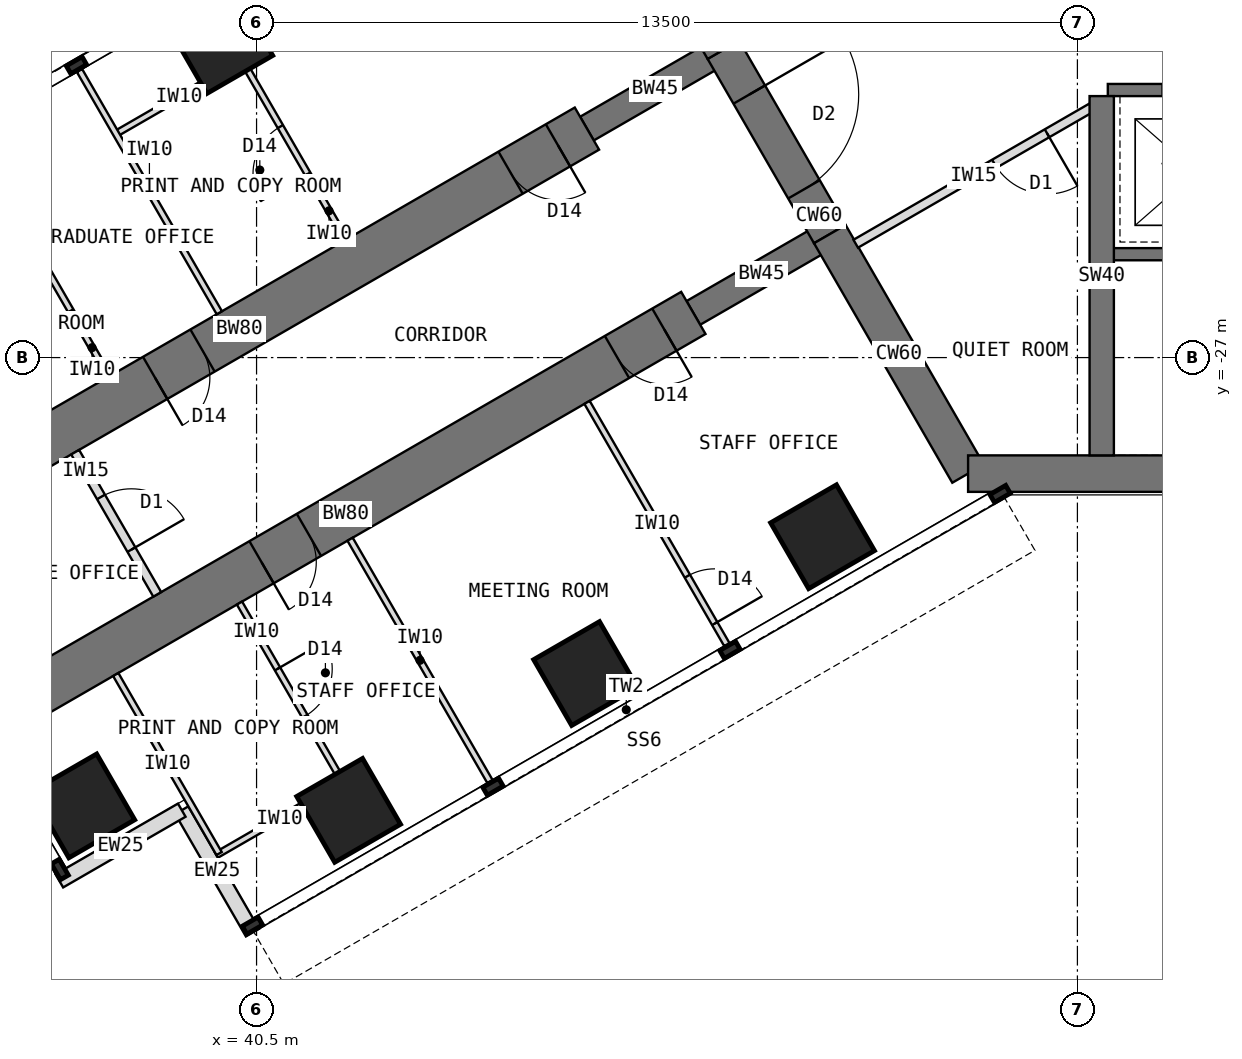
"""IFC4 building model, lengths in metres.
Left out: names, types, materials, properties, quantities, classifications, styles, units other than length and angle.
Written with IfcOpenShell. Run it as: python <this file> out.ifc"""

import sys

from ifc_helpers import new_model, si_unit, direction, frame, frame_2d, origin, origin_2d, place, context, subcontext, project, spatial, rectangle, extrude, element, fill, save


model = new_model("IFC4")
c1 = context("Model", 3, precision=1e-05, world=origin(), true_north=direction((0.0, 1.0)))
c2 = subcontext(c1, "Body", "Model", "MODEL_VIEW")
j1 = project(units=[si_unit("LENGTHUNIT", "METRE"), si_unit("PLANEANGLEUNIT", "RADIAN")], contexts=[c1])
p1 = place(None, origin())
s1 = spatial("IfcSite", under=j1, at=p1, CompositionType="ELEMENT")
p2 = place(p1, origin())
s2 = spatial("IfcBuilding", under=s1, at=p2, CompositionType="ELEMENT")
p3 = place(p2, frame((0.0, 0.0, 157.5)))
s3 = spatial("IfcBuildingStorey", under=s2, at=p3, CompositionType="ELEMENT", Elevation=157.5)
p4 = place(p3, frame((45.904, -18.0, 0.0), z_axis=(0.0, 0.0, 1.0), x_axis=(0.500024481964, -0.866011268655, 0.0)))
e1 = element("IfcWall", 1, at=p4, inside=s3, PredefinedType="SHEAR", context=c2, shape_type="SweptSolid", body=[
    extrude(rectangle(XDim=4.548, YDim=0.6, at=frame_2d((2.274, 0.0))), origin(), (0.0, 0.0, 1.0), 4.0),
])
p5 = place(p3, frame((48.178, -21.939, 0.0), z_axis=(0.0, 0.0, 1.0), x_axis=(0.500010275428, -0.866019471182, 0.0)))
e2 = element("IfcWall", 2, at=p5, inside=s3, PredefinedType="SHEAR", context=c2, shape_type="SweptSolid", body=[
    extrude(rectangle(XDim=3.5, YDim=0.6, at=frame_2d((1.75, 0.0))), origin(), (0.0, 0.0, 1.0), 4.0),
])
p6 = place(p5, frame((0.85, 0.0, 0.0)))
e3 = element("IfcOpeningElement", 3, at=p6, cuts=e2, PredefinedType="OPENING", context=c2, shape_type="SweptSolid", body=[
    extrude(rectangle(XDim=1.8, YDim=2.1, at=frame_2d((0.9, 1.05))), frame((0.0, 0.31, 0.0), z_axis=(0.0, -1.0, 0.0), x_axis=(1.0, 0.0, 0.0)), (0.0, 0.0, 1.0), 0.62),
])
p7 = place(p3, frame((49.928, -24.97, 0.0), z_axis=(0.0, 0.0, 1.0), x_axis=(0.499984222037, -0.866034513004, 0.0)))
e4 = element("IfcWall", 4, at=p7, inside=s3, PredefinedType="SHEAR", context=c2, shape_type="SweptSolid", body=[
    extrude(rectangle(XDim=4.548, YDim=0.6, at=frame_2d((2.274, 0.0))), origin(), (0.0, 0.0, 1.0), 4.0),
])
p8 = place(p3, frame((52.202, -28.908, 0.0), z_axis=(0.0, 0.0, 1.0), x_axis=(1.0, 0.0, 0.0)))
e5 = element("IfcWall", 5, at=p8, inside=s3, PredefinedType="SHEAR", context=c2, shape_type="SweptSolid", body=[
    extrude(rectangle(XDim=12.596, YDim=0.6, at=frame_2d((6.298, 0.0))), origin(), (0.0, 0.0, 1.0), 4.0),
])
p9 = place(p3, frame((49.928, -24.97, 0.0), z_axis=(0.0, 0.0, 1.0), x_axis=(-0.866031863473, -0.499988811324, 0.0)))
e6 = element("IfcWall", 6, at=p9, inside=s3, PredefinedType="SHEAR", context=c2, shape_type="SweptSolid", body=[
    extrude(rectangle(XDim=2.592, YDim=0.45, at=frame_2d((1.296, 0.0))), origin(), (0.0, 0.0, 1.0), 4.0),
])
p10 = place(p3, frame((47.684, -26.266, 0.0), z_axis=(0.0, 0.0, 1.0), x_axis=(-0.866027579429, -0.499996231654, 0.0)))
e7 = element("IfcWall", 7, at=p10, inside=s3, PredefinedType="SHEAR", context=c2, shape_type="SweptSolid", body=[
    extrude(rectangle(XDim=13.2, YDim=0.8, at=frame_2d((6.6, 0.0))), origin(), (0.0, 0.0, 1.0), 4.0),
])
p11 = place(p10, frame((0.55, 0.0, 0.0)))
e8 = element("IfcOpeningElement", 8, at=p11, cuts=e7, PredefinedType="OPENING", context=c2, shape_type="SweptSolid", body=[
    extrude(rectangle(XDim=0.9, YDim=2.1, at=frame_2d((0.45, 1.05))), frame((0.0, 0.41, 0.0), z_axis=(0.0, -1.0, 0.0), x_axis=(1.0, 0.0, 0.0)), (0.0, 0.0, 1.0), 0.82),
])
p12 = place(p10, frame((7.3, 0.0, 0.0)))
e9 = element("IfcOpeningElement", 9, at=p12, cuts=e7, PredefinedType="OPENING", context=c2, shape_type="SweptSolid", body=[
    extrude(rectangle(XDim=0.9, YDim=2.1, at=frame_2d((0.45, 1.05))), frame((0.0, 0.41, 0.0), z_axis=(0.0, -1.0, 0.0), x_axis=(1.0, 0.0, 0.0)), (0.0, 0.0, 1.0), 0.82),
])
p13 = place(p3, frame((48.178, -21.939, 0.0), z_axis=(0.0, 0.0, 1.0), x_axis=(-0.866072649678, -0.499918158782, 0.0)))
e10 = element("IfcWall", 10, at=p13, inside=s3, PredefinedType="SHEAR", context=c2, shape_type="SweptSolid", body=[
    extrude(rectangle(XDim=2.592, YDim=0.45, at=frame_2d((1.296, 0.0))), origin(), (0.0, 0.0, 1.0), 4.0),
])
p14 = place(p3, frame((45.934, -23.234, 0.0), z_axis=(0.0, 0.0, 1.0), x_axis=(-0.866019570528, -0.500010103361, 0.0)))
e11 = element("IfcWall", 11, at=p14, inside=s3, PredefinedType="SHEAR", context=c2, shape_type="SweptSolid", body=[
    extrude(rectangle(XDim=13.2, YDim=0.8, at=frame_2d((6.6, 0.0))), origin(), (0.0, 0.0, 1.0), 4.0),
])
p15 = place(p14, frame((0.55, 0.0, 0.0)))
e12 = element("IfcOpeningElement", 12, at=p15, cuts=e11, PredefinedType="OPENING", context=c2, shape_type="SweptSolid", body=[
    extrude(rectangle(XDim=0.9, YDim=2.1, at=frame_2d((0.45, 1.05))), frame((0.0, 0.41, 0.0), z_axis=(0.0, -1.0, 0.0), x_axis=(1.0, 0.0, 0.0)), (0.0, 0.0, 1.0), 0.82),
])
p16 = place(p14, frame((7.3, 0.0, 0.0)))
e13 = element("IfcOpeningElement", 13, at=p16, cuts=e11, PredefinedType="OPENING", context=c2, shape_type="SweptSolid", body=[
    extrude(rectangle(XDim=0.9, YDim=2.1, at=frame_2d((0.45, 1.05))), frame((0.0, 0.41, 0.0), z_axis=(0.0, -1.0, 0.0), x_axis=(1.0, 0.0, 0.0)), (0.0, 0.0, 1.0), 0.82),
])
for number, where, z_axis, x_axis in (
    (14, (49.809, -29.946, 0.0), (0.0, 0.0, 1.0), (0.866, 0.5, 0.0)),
    (15, (45.912, -32.196, 0.0), (0.0, 0.0, 1.0), (0.866, 0.5, 0.0)),
    (16, (39.912, -21.804, 0.0), (0.0, 0.0, 1.0), (0.866, 0.5, 0.0)),
    (17, (42.014, -34.446, 0.0), (0.0, 0.0, 1.0), (0.866, 0.5, 0.0)),
    (18, (37.642, -34.373, 0.0), (0.0, 0.0, 1.0), (0.866, 0.5, 0.0)),
):
    element("IfcColumn", number, at=place(p3, frame(where, z_axis=z_axis, x_axis=x_axis)), inside=s3, PredefinedType="COLUMN", context=c2, shape_type="SweptSolid", body=[
        extrude(rectangle(XDim=1.25, YDim=1.25, at=origin_2d()), origin(), (0.0, 0.0, 1.0), 4.0),
    ])
for number, where, z_axis, x_axis in (
    (19, (40.433, -36.456, 0.0), (0.0, 0.0, 1.0), (-0.5, 0.866, 0.0)),
    (20, (39.27, -34.443, 0.0), (0.0, 0.0, 1.0), (-0.866, -0.5, 0.0)),
):
    element("IfcWall", number, at=place(p3, frame(where, z_axis=z_axis, x_axis=x_axis)), inside=s3, PredefinedType="STANDARD", context=c2, shape_type="SweptSolid", body=[
        extrude(rectangle(XDim=2.325, YDim=0.25, at=frame_2d((1.163, 0.0))), origin(), (0.0, 0.0, 1.0), 3.8),
    ])
p17 = place(p3, frame((54.5, -22.6, 0.0), z_axis=(0.0, 0.0, 1.0), x_axis=(1.0, 0.0, 0.0)))
e21 = element("IfcWall", 21, at=p17, inside=s3, PredefinedType="SHEAR", context=c2, shape_type="SweptSolid", body=[
    extrude(rectangle(XDim=8.0, YDim=0.2, at=frame_2d((4.0, 0.0))), origin(), (0.0, 0.0, 1.0), 4.0),
])
p18 = place(p17, frame((6.3, 0.0, 0.0)))
e22 = element("IfcOpeningElement", 22, at=p18, cuts=e21, PredefinedType="OPENING", context=c2, shape_type="SweptSolid", body=[
    extrude(rectangle(XDim=1.2, YDim=2.1, at=frame_2d((0.6, 1.05))), frame((0.0, 0.11, 0.0), z_axis=(0.0, -1.0, 0.0), x_axis=(1.0, 0.0, 0.0)), (0.0, 0.0, 1.0), 0.22),
])
p19 = place(p17, frame((0.9, 0.0, 0.0)))
e23 = element("IfcOpeningElement", 23, at=p19, cuts=e21, PredefinedType="OPENING", context=c2, shape_type="SweptSolid", body=[
    extrude(rectangle(XDim=1.1, YDim=2.2, at=frame_2d((0.55, 1.1))), frame((0.0, 0.11, 0.0), z_axis=(0.0, -1.0, 0.0), x_axis=(1.0, 0.0, 0.0)), (0.0, 0.0, 1.0), 0.22),
])
p20 = place(p3, frame((54.5, -25.3, 0.0), z_axis=(0.0, 0.0, 1.0), x_axis=(1.0, 0.0, 0.0)))
e24 = element("IfcWall", 24, at=p20, inside=s3, PredefinedType="SHEAR", context=c2, shape_type="SweptSolid", body=[
    extrude(rectangle(XDim=8.0, YDim=0.2, at=frame_2d((4.0, 0.0))), origin(), (0.0, 0.0, 1.0), 4.0),
])
p21 = place(p20, frame((6.7, 0.0, 0.0)))
e25 = element("IfcOpeningElement", 25, at=p21, cuts=e24, PredefinedType="OPENING", context=c2, shape_type="SweptSolid", body=[
    extrude(rectangle(XDim=1.1, YDim=2.1, at=frame_2d((0.55, 1.05))), frame((0.0, 0.11, 0.0), z_axis=(0.0, -1.0, 0.0), x_axis=(1.0, 0.0, 0.0)), (0.0, 0.0, 1.0), 0.22),
])
p22 = place(p3, frame((54.4, -22.7, 0.0), z_axis=(0.0, 0.0, 1.0), x_axis=(0.0, -1.0, 0.0)))
e26 = element("IfcWall", 26, at=p22, inside=s3, PredefinedType="SHEAR", context=c2, shape_type="SweptSolid", body=[
    extrude(rectangle(XDim=5.908, YDim=0.4, at=frame_2d((2.954, 0.0))), origin(), (0.0, 0.0, 1.0), 4.0),
])
p23 = place(p3, frame((45.935, -27.737, 0.0), z_axis=(0.0, 0.0, 1.0), x_axis=(0.500014953309, -0.866016770315, 0.0)))
e27 = element("IfcWall", 27, at=p23, inside=s3, PredefinedType="PARTITIONING", context=c2, shape_type="SweptSolid", body=[
    extrude(rectangle(XDim=4.6, YDim=0.1, at=frame_2d((2.3, 0.0))), origin(), (0.0, 0.0, 1.0), 3.8),
])
p24 = place(p23, frame((3.3, 0.0, 0.0)))
e28 = element("IfcOpeningElement", 28, at=p24, cuts=e27, PredefinedType="OPENING", context=c2, shape_type="SweptSolid", body=[
    extrude(rectangle(XDim=0.9, YDim=2.1, at=frame_2d((0.45, 1.05))), frame((0.0, 0.06, 0.0), z_axis=(0.0, -1.0, 0.0), x_axis=(1.0, 0.0, 0.0)), (0.0, 0.0, 1.0), 0.12),
])
p25 = place(p3, frame((42.038, -29.987, 0.0), z_axis=(0.0, 0.0, 1.0), x_axis=(0.499975146636, -0.866039752405, 0.0)))
e29 = element("IfcWall", 29, at=p25, inside=s3, PredefinedType="PARTITIONING", context=c2, shape_type="SweptSolid", body=[
    extrude(rectangle(XDim=4.6, YDim=0.1, at=frame_2d((2.3, 0.0))), origin(), (0.0, 0.0, 1.0), 3.8),
])
p26 = place(p3, frame((41.919, -33.981, 0.0), z_axis=(0.0, 0.0, 1.0), x_axis=(-0.866050077142, -0.499957262057, 0.0)))
e30 = element("IfcWall", 30, at=p26, inside=s3, PredefinedType="PARTITIONING", context=c2, shape_type="SweptSolid", body=[
    extrude(rectangle(XDim=2.4, YDim=0.1, at=frame_2d((1.2, 0.0))), origin(), (0.0, 0.0, 1.0), 3.8),
])
p27 = place(p3, frame((40.219, -31.037, 0.0), z_axis=(0.0, 0.0, 1.0), x_axis=(0.500031147688, -0.866007419912, 0.0)))
e31 = element("IfcWall", 31, at=p27, inside=s3, PredefinedType="PARTITIONING", context=c2, shape_type="SweptSolid", body=[
    extrude(rectangle(XDim=3.4, YDim=0.1, at=frame_2d((1.7, 0.0))), origin(), (0.0, 0.0, 1.0), 3.8),
])
p28 = place(p27, frame((1.25, 0.0, 0.0)))
e32 = element("IfcOpeningElement", 32, at=p28, cuts=e31, PredefinedType="OPENING", context=c2, shape_type="SweptSolid", body=[
    extrude(rectangle(XDim=0.9, YDim=2.1, at=frame_2d((0.45, 1.05))), frame((0.0, 0.06, 0.0), z_axis=(0.0, -1.0, 0.0), x_axis=(1.0, 0.0, 0.0)), (0.0, 0.0, 1.0), 0.12),
])
p29 = place(p3, frame((38.184, -32.212, 0.0), z_axis=(0.0, 0.0, 1.0), x_axis=(0.500031147688, -0.866007419912, 0.0)))
e33 = element("IfcWall", 33, at=p29, inside=s3, PredefinedType="PARTITIONING", context=c2, shape_type="SweptSolid", body=[
    extrude(rectangle(XDim=3.4, YDim=0.1, at=frame_2d((1.7, 0.0))), origin(), (0.0, 0.0, 1.0), 3.8),
])
p30 = place(p3, frame((39.888, -26.263, 0.0), z_axis=(0.0, 0.0, 1.0), x_axis=(-0.500014953309, 0.866016770315, 0.0)))
e34 = element("IfcWall", 34, at=p30, inside=s3, PredefinedType="PARTITIONING", context=c2, shape_type="SweptSolid", body=[
    extrude(rectangle(XDim=4.6, YDim=0.1, at=frame_2d((2.3, 0.0))), origin(), (0.0, 0.0, 1.0), 3.8),
])
p31 = place(p3, frame((40.266, -22.119, 0.0), z_axis=(0.0, 0.0, 1.0), x_axis=(-0.866024647952, -0.500001309137, 0.0)))
e35 = element("IfcWall", 35, at=p31, inside=s3, PredefinedType="PARTITIONING", context=c2, shape_type="SweptSolid", body=[
    extrude(rectangle(XDim=2.4, YDim=0.1, at=frame_2d((1.2, 0.0))), origin(), (0.0, 0.0, 1.0), 3.8),
])
p32 = place(p3, frame((41.967, -25.063, 0.0), z_axis=(0.0, 0.0, 1.0), x_axis=(-0.500062241894, 0.865989465428, 0.0)))
e36 = element("IfcWall", 36, at=p32, inside=s3, PredefinedType="PARTITIONING", context=c2, shape_type="SweptSolid", body=[
    extrude(rectangle(XDim=3.4, YDim=0.1, at=frame_2d((1.7, 0.0))), origin(), (0.0, 0.0, 1.0), 3.8),
])
p33 = place(p32, frame((1.25, 0.0, 0.0)))
e37 = element("IfcOpeningElement", 37, at=p33, cuts=e36, PredefinedType="OPENING", context=c2, shape_type="SweptSolid", body=[
    extrude(rectangle(XDim=0.9, YDim=2.1, at=frame_2d((0.45, 1.05))), frame((0.0, 0.06, 0.0), z_axis=(0.0, -1.0, 0.0), x_axis=(1.0, 0.0, 0.0)), (0.0, 0.0, 1.0), 0.12),
])
p34 = place(p3, frame((38.069, -27.313, 0.0), z_axis=(0.0, 0.0, 1.0), x_axis=(-0.500008388397, 0.866020560687, 0.0)))
e38 = element("IfcWall", 38, at=p34, inside=s3, PredefinedType="PARTITIONING", context=c2, shape_type="SweptSolid", body=[
    extrude(rectangle(XDim=3.4, YDim=0.1, at=frame_2d((1.7, 0.0))), origin(), (0.0, 0.0, 1.0), 3.8),
])
p35 = place(p34, frame((1.25, 0.0, 0.0)))
e39 = element("IfcOpeningElement", 39, at=p35, cuts=e38, PredefinedType="OPENING", context=c2, shape_type="SweptSolid", body=[
    extrude(rectangle(XDim=0.9, YDim=2.1, at=frame_2d((0.45, 1.05))), frame((0.0, 0.06, 0.0), z_axis=(0.0, -1.0, 0.0), x_axis=(1.0, 0.0, 0.0)), (0.0, 0.0, 1.0), 0.12),
])
p36 = place(p3, frame((54.23, -22.89, 0.0), z_axis=(0.0, 0.0, 1.0), x_axis=(-0.866025707867, -0.499999473313, 0.0)))
e40 = element("IfcWall", 40, at=p36, inside=s3, PredefinedType="PARTITIONING", context=c2, shape_type="SweptSolid", body=[
    extrude(rectangle(XDim=4.476, YDim=0.15, at=frame_2d((2.238, 0.0))), origin(), (0.0, 0.0, 1.0), 3.8),
])
p37 = place(p36, frame((0.843, 0.0, 0.0)))
e41 = element("IfcOpeningElement", 41, at=p37, cuts=e40, PredefinedType="OPENING", context=c2, shape_type="SweptSolid", body=[
    extrude(rectangle(XDim=1.0, YDim=2.1, at=frame_2d((0.5, 1.05))), frame((0.0, 0.085, 0.0), z_axis=(0.0, -1.0, 0.0), x_axis=(1.0, 0.0, 0.0)), (0.0, 0.0, 1.0), 0.17),
])
p38 = place(p3, frame((37.517, -28.556, 0.0), z_axis=(0.0, 0.0, 1.0), x_axis=(0.500048589285, -0.86599734893, 0.0)))
e42 = element("IfcWall", 42, at=p38, inside=s3, PredefinedType="PARTITIONING", context=c2, shape_type="SweptSolid", body=[
    extrude(rectangle(XDim=2.7, YDim=0.15, at=frame_2d((1.35, 0.0))), origin(), (0.0, 0.0, 1.0), 3.8),
])
p39 = place(p38, frame((0.85, 0.0, 0.0)))
e43 = element("IfcOpeningElement", 43, at=p39, cuts=e42, PredefinedType="OPENING", context=c2, shape_type="SweptSolid", body=[
    extrude(rectangle(XDim=1.0, YDim=2.1, at=frame_2d((0.5, 1.05))), frame((0.0, 0.085, 0.0), z_axis=(0.0, -1.0, 0.0), x_axis=(1.0, 0.0, 0.0)), (0.0, 0.0, 1.0), 0.17),
])
p40 = place(p6, origin())
e44 = element("IfcDoor", 44, at=p40, inside=s3, OperationType="DOUBLE_DOOR_DOUBLE_SWING", PredefinedType="DOOR", context=c2, shape_type="SweptSolid", body=[
    extrude(rectangle(XDim=1.72, YDim=2.06, at=frame_2d((0.9, 1.03))), frame((0.0, 0.025, 0.0), z_axis=(0.0, -1.0, 0.0), x_axis=(1.0, 0.0, 0.0)), (0.0, 0.0, 1.0), 0.05),
    extrude(rectangle(XDim=0.04, YDim=2.1, at=frame_2d((0.02, 1.05))), frame((0.0, 0.3, 0.0), z_axis=(0.0, -1.0, 0.0), x_axis=(1.0, 0.0, 0.0)), (0.0, 0.0, 1.0), 0.6),
    extrude(rectangle(XDim=0.04, YDim=2.1, at=frame_2d((1.78, 1.05))), frame((0.0, 0.3, 0.0), z_axis=(0.0, -1.0, 0.0), x_axis=(1.0, 0.0, 0.0)), (0.0, 0.0, 1.0), 0.6),
    extrude(rectangle(XDim=1.72, YDim=0.04, at=frame_2d((0.9, 2.08))), frame((0.0, 0.3, 0.0), z_axis=(0.0, -1.0, 0.0), x_axis=(1.0, 0.0, 0.0)), (0.0, 0.0, 1.0), 0.6),
])
fill(e3, e44)
p41 = place(p24, origin())
e45 = element("IfcDoor", 45, at=p41, inside=s3, OperationType="SINGLE_SWING_RIGHT", PredefinedType="DOOR", context=c2, shape_type="SweptSolid", body=[
    extrude(rectangle(XDim=0.9, YDim=2.1, at=frame_2d((0.45, 1.05))), frame((0.0, 0.025, 0.0), z_axis=(0.0, -1.0, 0.0), x_axis=(1.0, 0.0, 0.0)), (0.0, 0.0, 1.0), 0.05),
])
fill(e28, e45)
p42 = place(p28, origin())
e46 = element("IfcDoor", 46, at=p42, inside=s3, OperationType="SINGLE_SWING_LEFT", PredefinedType="DOOR", context=c2, shape_type="SweptSolid", body=[
    extrude(rectangle(XDim=0.9, YDim=2.1, at=frame_2d((0.45, 1.05))), frame((0.0, 0.025, 0.0), z_axis=(0.0, -1.0, 0.0), x_axis=(1.0, 0.0, 0.0)), (0.0, 0.0, 1.0), 0.05),
])
fill(e32, e46)
p43 = place(p33, origin())
e47 = element("IfcDoor", 47, at=p43, inside=s3, OperationType="SINGLE_SWING_LEFT", PredefinedType="DOOR", context=c2, shape_type="SweptSolid", body=[
    extrude(rectangle(XDim=0.9, YDim=2.1, at=frame_2d((0.45, 1.05))), frame((0.0, 0.025, 0.0), z_axis=(0.0, -1.0, 0.0), x_axis=(1.0, 0.0, 0.0)), (0.0, 0.0, 1.0), 0.05),
])
fill(e37, e47)
p44 = place(p35, origin())
e48 = element("IfcDoor", 48, at=p44, inside=s3, OperationType="SINGLE_SWING_LEFT", PredefinedType="DOOR", context=c2, shape_type="SweptSolid", body=[
    extrude(rectangle(XDim=0.9, YDim=2.1, at=frame_2d((0.45, 1.05))), frame((0.0, 0.025, 0.0), z_axis=(0.0, -1.0, 0.0), x_axis=(1.0, 0.0, 0.0)), (0.0, 0.0, 1.0), 0.05),
])
fill(e39, e48)
p45 = place(p37, origin())
e49 = element("IfcDoor", 49, at=p45, inside=s3, OperationType="SINGLE_SWING_LEFT", PredefinedType="DOOR", context=c2, shape_type="SweptSolid", body=[
    extrude(rectangle(XDim=1.0, YDim=2.1, at=frame_2d((0.5, 1.05))), frame((0.0, 0.025, 0.0), z_axis=(0.0, -1.0, 0.0), x_axis=(1.0, 0.0, 0.0)), (0.0, 0.0, 1.0), 0.05),
])
fill(e41, e49)
p46 = place(p39, origin())
e50 = element("IfcDoor", 50, at=p46, inside=s3, OperationType="SINGLE_SWING_RIGHT", PredefinedType="DOOR", context=c2, shape_type="SweptSolid", body=[
    extrude(rectangle(XDim=1.0, YDim=2.1, at=frame_2d((0.5, 1.05))), frame((0.0, 0.025, 0.0), z_axis=(0.0, -1.0, 0.0), x_axis=(1.0, 0.0, 0.0)), (0.0, 0.0, 1.0), 0.05),
])
fill(e43, e50)
p47 = place(p11, origin())
e51 = element("IfcDoor", 51, at=p47, inside=s3, OperationType="SINGLE_SWING_LEFT", PredefinedType="DOOR", context=c2, shape_type="SweptSolid", body=[
    extrude(rectangle(XDim=0.82, YDim=2.06, at=frame_2d((0.45, 1.03))), frame((0.0, 0.025, 0.0), z_axis=(0.0, -1.0, 0.0), x_axis=(1.0, 0.0, 0.0)), (0.0, 0.0, 1.0), 0.05),
    extrude(rectangle(XDim=0.04, YDim=2.1, at=frame_2d((0.02, 1.05))), frame((0.0, 0.4, 0.0), z_axis=(0.0, -1.0, 0.0), x_axis=(1.0, 0.0, 0.0)), (0.0, 0.0, 1.0), 0.8),
    extrude(rectangle(XDim=0.04, YDim=2.1, at=frame_2d((0.88, 1.05))), frame((0.0, 0.4, 0.0), z_axis=(0.0, -1.0, 0.0), x_axis=(1.0, 0.0, 0.0)), (0.0, 0.0, 1.0), 0.8),
    extrude(rectangle(XDim=0.82, YDim=0.04, at=frame_2d((0.45, 2.08))), frame((0.0, 0.4, 0.0), z_axis=(0.0, -1.0, 0.0), x_axis=(1.0, 0.0, 0.0)), (0.0, 0.0, 1.0), 0.8),
])
fill(e8, e51)
p48 = place(p12, origin())
e52 = element("IfcDoor", 52, at=p48, inside=s3, OperationType="SINGLE_SWING_RIGHT", PredefinedType="DOOR", context=c2, shape_type="SweptSolid", body=[
    extrude(rectangle(XDim=0.82, YDim=2.06, at=frame_2d((0.45, 1.03))), frame((0.0, 0.025, 0.0), z_axis=(0.0, -1.0, 0.0), x_axis=(1.0, 0.0, 0.0)), (0.0, 0.0, 1.0), 0.05),
    extrude(rectangle(XDim=0.04, YDim=2.1, at=frame_2d((0.02, 1.05))), frame((0.0, 0.4, 0.0), z_axis=(0.0, -1.0, 0.0), x_axis=(1.0, 0.0, 0.0)), (0.0, 0.0, 1.0), 0.8),
    extrude(rectangle(XDim=0.04, YDim=2.1, at=frame_2d((0.88, 1.05))), frame((0.0, 0.4, 0.0), z_axis=(0.0, -1.0, 0.0), x_axis=(1.0, 0.0, 0.0)), (0.0, 0.0, 1.0), 0.8),
    extrude(rectangle(XDim=0.82, YDim=0.04, at=frame_2d((0.45, 2.08))), frame((0.0, 0.4, 0.0), z_axis=(0.0, -1.0, 0.0), x_axis=(1.0, 0.0, 0.0)), (0.0, 0.0, 1.0), 0.8),
])
fill(e9, e52)
p49 = place(p15, origin())
e53 = element("IfcDoor", 53, at=p49, inside=s3, OperationType="SINGLE_SWING_LEFT", PredefinedType="DOOR", context=c2, shape_type="SweptSolid", body=[
    extrude(rectangle(XDim=0.82, YDim=2.06, at=frame_2d((0.45, 1.03))), frame((0.0, 0.025, 0.0), z_axis=(0.0, -1.0, 0.0), x_axis=(1.0, 0.0, 0.0)), (0.0, 0.0, 1.0), 0.05),
    extrude(rectangle(XDim=0.04, YDim=2.1, at=frame_2d((0.02, 1.05))), frame((0.0, 0.4, 0.0), z_axis=(0.0, -1.0, 0.0), x_axis=(1.0, 0.0, 0.0)), (0.0, 0.0, 1.0), 0.8),
    extrude(rectangle(XDim=0.04, YDim=2.1, at=frame_2d((0.88, 1.05))), frame((0.0, 0.4, 0.0), z_axis=(0.0, -1.0, 0.0), x_axis=(1.0, 0.0, 0.0)), (0.0, 0.0, 1.0), 0.8),
    extrude(rectangle(XDim=0.82, YDim=0.04, at=frame_2d((0.45, 2.08))), frame((0.0, 0.4, 0.0), z_axis=(0.0, -1.0, 0.0), x_axis=(1.0, 0.0, 0.0)), (0.0, 0.0, 1.0), 0.8),
])
fill(e12, e53)
p50 = place(p16, origin())
e54 = element("IfcDoor", 54, at=p50, inside=s3, OperationType="SINGLE_SWING_RIGHT", PredefinedType="DOOR", context=c2, shape_type="SweptSolid", body=[
    extrude(rectangle(XDim=0.82, YDim=2.06, at=frame_2d((0.45, 1.03))), frame((0.0, 0.025, 0.0), z_axis=(0.0, -1.0, 0.0), x_axis=(1.0, 0.0, 0.0)), (0.0, 0.0, 1.0), 0.05),
    extrude(rectangle(XDim=0.04, YDim=2.1, at=frame_2d((0.02, 1.05))), frame((0.0, 0.4, 0.0), z_axis=(0.0, -1.0, 0.0), x_axis=(1.0, 0.0, 0.0)), (0.0, 0.0, 1.0), 0.8),
    extrude(rectangle(XDim=0.04, YDim=2.1, at=frame_2d((0.88, 1.05))), frame((0.0, 0.4, 0.0), z_axis=(0.0, -1.0, 0.0), x_axis=(1.0, 0.0, 0.0)), (0.0, 0.0, 1.0), 0.8),
    extrude(rectangle(XDim=0.82, YDim=0.04, at=frame_2d((0.45, 2.08))), frame((0.0, 0.4, 0.0), z_axis=(0.0, -1.0, 0.0), x_axis=(1.0, 0.0, 0.0)), (0.0, 0.0, 1.0), 0.8),
])
fill(e13, e54)
save(model, sys.argv[1])
